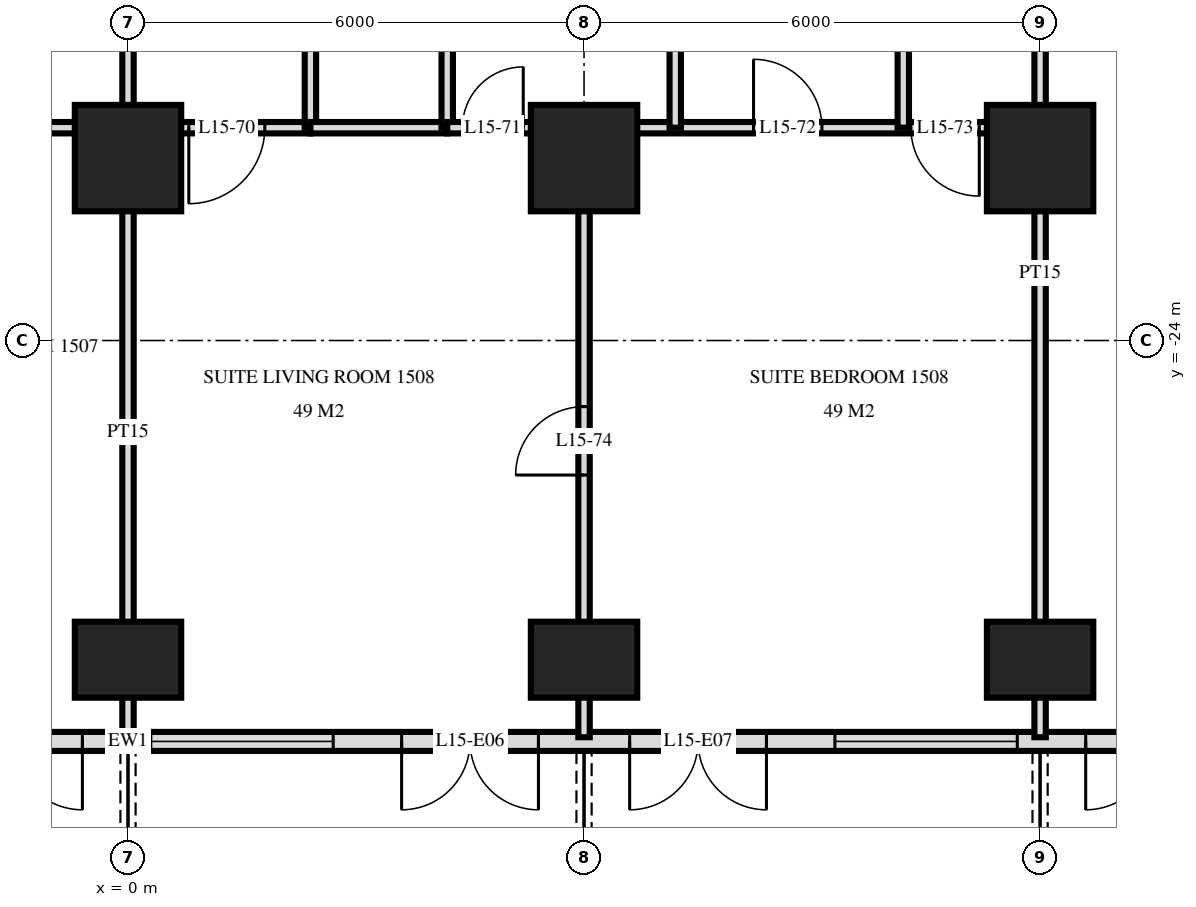
"""IFC4 building model, lengths in metres.
Left out: names, types, materials, properties, quantities, classifications, styles, units other than length and angle.
Written with IfcOpenShell. Run it as: python <this file> out.ifc"""

import sys

from ifc_helpers import new_model, si_unit, direction, frame, frame_2d, origin, origin_2d, place, context, subcontext, project, spatial, rectangle, extrude, element, fill, save


model = new_model("IFC4")
c1 = context("Model", 3, precision=1e-05, world=origin(), true_north=direction((0.0, 1.0)))
c2 = subcontext(c1, "Body", "Model", "MODEL_VIEW")
j1 = project(units=[si_unit("LENGTHUNIT", "METRE"), si_unit("PLANEANGLEUNIT", "RADIAN")], contexts=[c1])
p1 = place(None, origin())
s1 = spatial("IfcSite", under=j1, at=p1, CompositionType="ELEMENT")
p2 = place(p1, origin())
s2 = spatial("IfcBuilding", under=s1, at=p2, CompositionType="ELEMENT")
p3 = place(p2, frame((0.0, 0.0, 63.6)))
s3 = spatial("IfcBuildingStorey", under=s2, at=p3, CompositionType="ELEMENT", Elevation=63.6)
p4 = place(p3, frame((0.0, -28.2, 0.0), z_axis=(0.0, 0.0, 1.0), x_axis=(1.0, 0.0, 0.0)))
e1 = element("IfcColumn", 1, at=p4, inside=s3, PredefinedType="COLUMN", context=c2, shape_type="SweptSolid", body=[
    extrude(rectangle(XDim=1.4, YDim=1.0, at=origin_2d()), origin(), (0.0, 0.0, 1.0), 3.6),
])
p5 = place(p3, frame((0.0, -21.6, 0.0), z_axis=(0.0, 0.0, 1.0), x_axis=(1.0, 0.0, 0.0)))
e2 = element("IfcColumn", 2, at=p5, inside=s3, PredefinedType="COLUMN", context=c2, shape_type="SweptSolid", body=[
    extrude(rectangle(XDim=1.4, YDim=1.4, at=origin_2d()), origin(), (0.0, 0.0, 1.0), 3.6),
])
p6 = place(p3, frame((6.0, -28.2, 0.0), z_axis=(0.0, 0.0, 1.0), x_axis=(1.0, 0.0, 0.0)))
e3 = element("IfcColumn", 3, at=p6, inside=s3, PredefinedType="COLUMN", context=c2, shape_type="SweptSolid", body=[
    extrude(rectangle(XDim=1.4, YDim=1.0, at=origin_2d()), origin(), (0.0, 0.0, 1.0), 3.6),
])
p7 = place(p3, frame((6.0, -21.6, 0.0), z_axis=(0.0, 0.0, 1.0), x_axis=(1.0, 0.0, 0.0)))
e4 = element("IfcColumn", 4, at=p7, inside=s3, PredefinedType="COLUMN", context=c2, shape_type="SweptSolid", body=[
    extrude(rectangle(XDim=1.4, YDim=1.4, at=origin_2d()), origin(), (0.0, 0.0, 1.0), 3.6),
])
p8 = place(p3, frame((12.0, -28.2, 0.0), z_axis=(0.0, 0.0, 1.0), x_axis=(1.0, 0.0, 0.0)))
e5 = element("IfcColumn", 5, at=p8, inside=s3, PredefinedType="COLUMN", context=c2, shape_type="SweptSolid", body=[
    extrude(rectangle(XDim=1.4, YDim=1.0, at=origin_2d()), origin(), (0.0, 0.0, 1.0), 3.6),
])
p9 = place(p3, frame((12.0, -21.6, 0.0), z_axis=(0.0, 0.0, 1.0), x_axis=(1.0, 0.0, 0.0)))
e6 = element("IfcColumn", 6, at=p9, inside=s3, PredefinedType="COLUMN", context=c2, shape_type="SweptSolid", body=[
    extrude(rectangle(XDim=1.4, YDim=1.4, at=origin_2d()), origin(), (0.0, 0.0, 1.0), 3.6),
])
p10 = place(p3, frame((-28.775, -29.275, 0.0), z_axis=(0.0, 0.0, 1.0), x_axis=(1.0, 0.0, 0.0)))
e7 = element("IfcWall", 7, at=p10, inside=s3, PredefinedType="SOLIDWALL", context=c2, shape_type="SweptSolid", body=[
    extrude(rectangle(XDim=57.551, YDim=0.25, at=frame_2d((28.775, 0.0))), origin(), (0.0, 0.0, 1.0), 3.32),
])
p11 = place(p10, frame((0.575, 0.0, 0.0)))
e8 = element("IfcOpeningElement", 8, at=p11, cuts=e7, PredefinedType="OPENING", context=c2, shape_type="SweptSolid", body=[
    extrude(rectangle(XDim=1.8, YDim=2.4, at=frame_2d((0.9, 1.2))), frame((0.0, 0.135, 0.0), z_axis=(0.0, -1.0, 0.0), x_axis=(1.0, 0.0, 0.0)), (0.0, 0.0, 1.0), 0.27),
])
p12 = place(p10, frame((5.375, 0.0, 0.0)))
e9 = element("IfcOpeningElement", 9, at=p12, cuts=e7, PredefinedType="OPENING", context=c2, shape_type="SweptSolid", body=[
    extrude(rectangle(XDim=1.8, YDim=2.4, at=frame_2d((0.9, 1.2))), frame((0.0, 0.135, 0.0), z_axis=(0.0, -1.0, 0.0), x_axis=(1.0, 0.0, 0.0)), (0.0, 0.0, 1.0), 0.27),
])
p13 = place(p10, frame((8.075, 0.0, 0.3)))
e10 = element("IfcOpeningElement", 10, at=p13, cuts=e7, PredefinedType="OPENING", context=c2, shape_type="SweptSolid", body=[
    extrude(rectangle(XDim=2.4, YDim=2.1, at=frame_2d((1.2, 1.05))), frame((0.0, 0.135, 0.0), z_axis=(0.0, -1.0, 0.0), x_axis=(1.0, 0.0, 0.0)), (0.0, 0.0, 1.0), 0.27),
])
p14 = place(p10, frame((11.375, 0.0, 0.0)))
e11 = element("IfcOpeningElement", 11, at=p14, cuts=e7, PredefinedType="OPENING", context=c2, shape_type="SweptSolid", body=[
    extrude(rectangle(XDim=1.8, YDim=2.4, at=frame_2d((0.9, 1.2))), frame((0.0, 0.135, 0.0), z_axis=(0.0, -1.0, 0.0), x_axis=(1.0, 0.0, 0.0)), (0.0, 0.0, 1.0), 0.27),
])
p15 = place(p10, frame((14.075, 0.0, 0.3)))
e12 = element("IfcOpeningElement", 12, at=p15, cuts=e7, PredefinedType="OPENING", context=c2, shape_type="SweptSolid", body=[
    extrude(rectangle(XDim=2.4, YDim=2.1, at=frame_2d((1.2, 1.05))), frame((0.0, 0.135, 0.0), z_axis=(0.0, -1.0, 0.0), x_axis=(1.0, 0.0, 0.0)), (0.0, 0.0, 1.0), 0.27),
])
p16 = place(p10, frame((17.375, 0.0, 0.0)))
e13 = element("IfcOpeningElement", 13, at=p16, cuts=e7, PredefinedType="OPENING", context=c2, shape_type="SweptSolid", body=[
    extrude(rectangle(XDim=1.8, YDim=2.4, at=frame_2d((0.9, 1.2))), frame((0.0, 0.135, 0.0), z_axis=(0.0, -1.0, 0.0), x_axis=(1.0, 0.0, 0.0)), (0.0, 0.0, 1.0), 0.27),
])
p17 = place(p10, frame((20.075, 0.0, 0.3)))
e14 = element("IfcOpeningElement", 14, at=p17, cuts=e7, PredefinedType="OPENING", context=c2, shape_type="SweptSolid", body=[
    extrude(rectangle(XDim=2.4, YDim=2.1, at=frame_2d((1.2, 1.05))), frame((0.0, 0.135, 0.0), z_axis=(0.0, -1.0, 0.0), x_axis=(1.0, 0.0, 0.0)), (0.0, 0.0, 1.0), 0.27),
])
p18 = place(p10, frame((23.075, 0.0, 0.3)))
e15 = element("IfcOpeningElement", 15, at=p18, cuts=e7, PredefinedType="OPENING", context=c2, shape_type="SweptSolid", body=[
    extrude(rectangle(XDim=2.4, YDim=2.1, at=frame_2d((1.2, 1.05))), frame((0.0, 0.135, 0.0), z_axis=(0.0, -1.0, 0.0), x_axis=(1.0, 0.0, 0.0)), (0.0, 0.0, 1.0), 0.27),
])
p19 = place(p10, frame((26.375, 0.0, 0.0)))
e16 = element("IfcOpeningElement", 16, at=p19, cuts=e7, PredefinedType="OPENING", context=c2, shape_type="SweptSolid", body=[
    extrude(rectangle(XDim=1.8, YDim=2.4, at=frame_2d((0.9, 1.2))), frame((0.0, 0.135, 0.0), z_axis=(0.0, -1.0, 0.0), x_axis=(1.0, 0.0, 0.0)), (0.0, 0.0, 1.0), 0.27),
])
p20 = place(p10, frame((29.075, 0.0, 0.3)))
e17 = element("IfcOpeningElement", 17, at=p20, cuts=e7, PredefinedType="OPENING", context=c2, shape_type="SweptSolid", body=[
    extrude(rectangle(XDim=2.4, YDim=2.1, at=frame_2d((1.2, 1.05))), frame((0.0, 0.135, 0.0), z_axis=(0.0, -1.0, 0.0), x_axis=(1.0, 0.0, 0.0)), (0.0, 0.0, 1.0), 0.27),
])
p21 = place(p10, frame((32.375, 0.0, 0.0)))
e18 = element("IfcOpeningElement", 18, at=p21, cuts=e7, PredefinedType="OPENING", context=c2, shape_type="SweptSolid", body=[
    extrude(rectangle(XDim=1.8, YDim=2.4, at=frame_2d((0.9, 1.2))), frame((0.0, 0.135, 0.0), z_axis=(0.0, -1.0, 0.0), x_axis=(1.0, 0.0, 0.0)), (0.0, 0.0, 1.0), 0.27),
])
p22 = place(p10, frame((35.375, 0.0, 0.0)))
e19 = element("IfcOpeningElement", 19, at=p22, cuts=e7, PredefinedType="OPENING", context=c2, shape_type="SweptSolid", body=[
    extrude(rectangle(XDim=1.8, YDim=2.4, at=frame_2d((0.9, 1.2))), frame((0.0, 0.135, 0.0), z_axis=(0.0, -1.0, 0.0), x_axis=(1.0, 0.0, 0.0)), (0.0, 0.0, 1.0), 0.27),
])
p23 = place(p10, frame((38.075, 0.0, 0.3)))
e20 = element("IfcOpeningElement", 20, at=p23, cuts=e7, PredefinedType="OPENING", context=c2, shape_type="SweptSolid", body=[
    extrude(rectangle(XDim=2.4, YDim=2.1, at=frame_2d((1.2, 1.05))), frame((0.0, 0.135, 0.0), z_axis=(0.0, -1.0, 0.0), x_axis=(1.0, 0.0, 0.0)), (0.0, 0.0, 1.0), 0.27),
])
p24 = place(p10, frame((41.375, 0.0, 0.0)))
e21 = element("IfcOpeningElement", 21, at=p24, cuts=e7, PredefinedType="OPENING", context=c2, shape_type="SweptSolid", body=[
    extrude(rectangle(XDim=1.8, YDim=2.4, at=frame_2d((0.9, 1.2))), frame((0.0, 0.135, 0.0), z_axis=(0.0, -1.0, 0.0), x_axis=(1.0, 0.0, 0.0)), (0.0, 0.0, 1.0), 0.27),
])
p25 = place(p10, frame((44.075, 0.0, 0.3)))
e22 = element("IfcOpeningElement", 22, at=p25, cuts=e7, PredefinedType="OPENING", context=c2, shape_type="SweptSolid", body=[
    extrude(rectangle(XDim=2.4, YDim=2.1, at=frame_2d((1.2, 1.05))), frame((0.0, 0.135, 0.0), z_axis=(0.0, -1.0, 0.0), x_axis=(1.0, 0.0, 0.0)), (0.0, 0.0, 1.0), 0.27),
])
p26 = place(p10, frame((47.075, 0.0, 0.3)))
e23 = element("IfcOpeningElement", 23, at=p26, cuts=e7, PredefinedType="OPENING", context=c2, shape_type="SweptSolid", body=[
    extrude(rectangle(XDim=2.4, YDim=2.1, at=frame_2d((1.2, 1.05))), frame((0.0, 0.135, 0.0), z_axis=(0.0, -1.0, 0.0), x_axis=(1.0, 0.0, 0.0)), (0.0, 0.0, 1.0), 0.27),
])
p27 = place(p10, frame((50.375, 0.0, 0.0)))
e24 = element("IfcOpeningElement", 24, at=p27, cuts=e7, PredefinedType="OPENING", context=c2, shape_type="SweptSolid", body=[
    extrude(rectangle(XDim=1.8, YDim=2.4, at=frame_2d((0.9, 1.2))), frame((0.0, 0.135, 0.0), z_axis=(0.0, -1.0, 0.0), x_axis=(1.0, 0.0, 0.0)), (0.0, 0.0, 1.0), 0.27),
])
p28 = place(p10, frame((53.375, 0.0, 0.0)))
e25 = element("IfcOpeningElement", 25, at=p28, cuts=e7, PredefinedType="OPENING", context=c2, shape_type="SweptSolid", body=[
    extrude(rectangle(XDim=1.8, YDim=2.4, at=frame_2d((0.9, 1.2))), frame((0.0, 0.135, 0.0), z_axis=(0.0, -1.0, 0.0), x_axis=(1.0, 0.0, 0.0)), (0.0, 0.0, 1.0), 0.27),
])
p29 = place(p3, frame((12.0, -29.22, 0.0), z_axis=(0.0, 0.0, 1.0), x_axis=(0.0, 1.0, 0.0)))
e26 = element("IfcWall", 26, at=p29, inside=s3, PredefinedType="PARTITIONING", context=c2, shape_type="SweptSolid", body=[
    extrude(rectangle(XDim=12.22, YDim=0.15, at=frame_2d((6.11, 0.0))), origin(), (0.0, 0.0, 1.0), 3.32),
])
for number, where, z_axis, x_axis in (
    (27, (10.2, -21.2, 0.0), (0.0, 0.0, 1.0), (0.0, 1.0, 0.0)),
    (28, (7.2, -21.2, 0.0), (0.0, 0.0, 1.0), (0.0, 1.0, 0.0)),
):
    element("IfcWall", number, at=place(p3, frame(where, z_axis=z_axis, x_axis=x_axis)), inside=s3, PredefinedType="PARTITIONING", context=c2, shape_type="SweptSolid", body=[
        extrude(rectangle(XDim=4.2, YDim=0.15, at=frame_2d((2.1, 0.0))), origin(), (0.0, 0.0, 1.0), 3.32),
    ])
p30 = place(p3, frame((6.0, -29.22, 0.0), z_axis=(0.0, 0.0, 1.0), x_axis=(0.0, 1.0, 0.0)))
e29 = element("IfcWall", 29, at=p30, inside=s3, PredefinedType="PARTITIONING", context=c2, shape_type="SweptSolid", body=[
    extrude(rectangle(XDim=8.02, YDim=0.15, at=frame_2d((4.01, 0.0))), origin(), (0.0, 0.0, 1.0), 3.32),
])
p31 = place(p30, frame((3.45, 0.0, 0.0)))
e30 = element("IfcOpeningElement", 30, at=p31, cuts=e29, PredefinedType="OPENING", context=c2, shape_type="SweptSolid", body=[
    extrude(rectangle(XDim=0.9, YDim=2.1, at=frame_2d((0.45, 1.05))), frame((0.0, 0.085, 0.0), z_axis=(0.0, -1.0, 0.0), x_axis=(1.0, 0.0, 0.0)), (0.0, 0.0, 1.0), 0.17),
])
p32 = place(p3, frame((4.2, -21.2, 0.0), z_axis=(0.0, 0.0, 1.0), x_axis=(0.0, 1.0, 0.0)))
e31 = element("IfcWall", 31, at=p32, inside=s3, PredefinedType="PLUMBINGWALL", context=c2, shape_type="SweptSolid", body=[
    extrude(rectangle(XDim=4.2, YDim=0.15, at=frame_2d((2.1, 0.0))), origin(), (0.0, 0.0, 1.0), 3.32),
])
p33 = place(p3, frame((2.4, -21.2, 0.0), z_axis=(0.0, 0.0, 1.0), x_axis=(0.0, 1.0, 0.0)))
e32 = element("IfcWall", 32, at=p33, inside=s3, PredefinedType="PARTITIONING", context=c2, shape_type="SweptSolid", body=[
    extrude(rectangle(XDim=4.2, YDim=0.15, at=frame_2d((2.1, 0.0))), origin(), (0.0, 0.0, 1.0), 3.32),
])
p34 = place(p33, frame((1.6, 0.0, 0.0)))
e33 = element("IfcOpeningElement", 33, at=p34, cuts=e32, PredefinedType="OPENING", context=c2, shape_type="SweptSolid", body=[
    extrude(rectangle(XDim=1.0, YDim=2.1, at=frame_2d((0.5, 1.05))), frame((0.0, 0.085, 0.0), z_axis=(0.0, -1.0, 0.0), x_axis=(1.0, 0.0, 0.0)), (0.0, 0.0, 1.0), 0.17),
])
p35 = place(p3, frame((0.0, -21.2, 0.0), z_axis=(0.0, 0.0, 1.0), x_axis=(0.0, 1.0, 0.0)))
e34 = element("IfcWall", 34, at=p35, inside=s3, PredefinedType="PARTITIONING", context=c2, shape_type="SweptSolid", body=[
    extrude(rectangle(XDim=4.2, YDim=0.15, at=frame_2d((2.1, 0.0))), origin(), (0.0, 0.0, 1.0), 3.32),
])
p36 = place(p3, frame((0.0, -29.22, 0.0), z_axis=(0.0, 0.0, 1.0), x_axis=(0.0, 1.0, 0.0)))
e35 = element("IfcWall", 35, at=p36, inside=s3, PredefinedType="PARTITIONING", context=c2, shape_type="SweptSolid", body=[
    extrude(rectangle(XDim=8.02, YDim=0.15, at=frame_2d((4.01, 0.0))), origin(), (0.0, 0.0, 1.0), 3.32),
])
p37 = place(p3, frame((0.0, -21.2, 0.0), z_axis=(0.0, 0.0, 1.0), x_axis=(1.0, 0.0, 0.0)))
e36 = element("IfcWall", 36, at=p37, inside=s3, PredefinedType="PARTITIONING", context=c2, shape_type="SweptSolid", body=[
    extrude(rectangle(XDim=2.4, YDim=0.15, at=frame_2d((1.2, 0.0))), origin(), (0.0, 0.0, 1.0), 3.32),
])
p38 = place(p37, frame((0.8, 0.0, 0.0)))
e37 = element("IfcOpeningElement", 37, at=p38, cuts=e36, PredefinedType="OPENING", context=c2, shape_type="SweptSolid", body=[
    extrude(rectangle(XDim=1.0, YDim=2.1, at=frame_2d((0.5, 1.05))), frame((0.0, 0.085, 0.0), z_axis=(0.0, -1.0, 0.0), x_axis=(1.0, 0.0, 0.0)), (0.0, 0.0, 1.0), 0.17),
])
p39 = place(p3, frame((-1.7, -21.2, 0.0), z_axis=(0.0, 0.0, 1.0), x_axis=(1.0, 0.0, 0.0)))
e38 = element("IfcWall", 38, at=p39, inside=s3, PredefinedType="PARTITIONING", context=c2, shape_type="SweptSolid", body=[
    extrude(rectangle(XDim=1.7, YDim=0.15, at=frame_2d((0.85, 0.0))), origin(), (0.0, 0.0, 1.0), 3.32),
])
p40 = place(p3, frame((4.2, -21.2, 0.0), z_axis=(0.0, 0.0, 1.0), x_axis=(1.0, 0.0, 0.0)))
e39 = element("IfcWall", 39, at=p40, inside=s3, PredefinedType="PARTITIONING", context=c2, shape_type="SweptSolid", body=[
    extrude(rectangle(XDim=7.8, YDim=0.15, at=frame_2d((3.9, 0.0))), origin(), (0.0, 0.0, 1.0), 3.32),
])
p41 = place(p40, frame((0.2, 0.0, 0.0)))
e40 = element("IfcOpeningElement", 40, at=p41, cuts=e39, PredefinedType="OPENING", context=c2, shape_type="SweptSolid", body=[
    extrude(rectangle(XDim=0.8, YDim=2.1, at=frame_2d((0.4, 1.05))), frame((0.0, 0.085, 0.0), z_axis=(0.0, -1.0, 0.0), x_axis=(1.0, 0.0, 0.0)), (0.0, 0.0, 1.0), 0.17),
])
p42 = place(p40, frame((4.03, 0.0, 0.0)))
e41 = element("IfcOpeningElement", 41, at=p42, cuts=e39, PredefinedType="OPENING", context=c2, shape_type="SweptSolid", body=[
    extrude(rectangle(XDim=0.9, YDim=2.1, at=frame_2d((0.45, 1.05))), frame((0.0, 0.085, 0.0), z_axis=(0.0, -1.0, 0.0), x_axis=(1.0, 0.0, 0.0)), (0.0, 0.0, 1.0), 0.17),
])
p43 = place(p40, frame((6.1, 0.0, 0.0)))
e42 = element("IfcOpeningElement", 42, at=p43, cuts=e39, PredefinedType="OPENING", context=c2, shape_type="SweptSolid", body=[
    extrude(rectangle(XDim=0.9, YDim=2.1, at=frame_2d((0.45, 1.05))), frame((0.0, 0.085, 0.0), z_axis=(0.0, -1.0, 0.0), x_axis=(1.0, 0.0, 0.0)), (0.0, 0.0, 1.0), 0.17),
])
p44 = place(p3, frame((2.4, -21.2, 0.0), z_axis=(0.0, 0.0, 1.0), x_axis=(1.0, 0.0, 0.0)))
e43 = element("IfcWall", 43, at=p44, inside=s3, PredefinedType="PLUMBINGWALL", context=c2, shape_type="SweptSolid", body=[
    extrude(rectangle(XDim=1.8, YDim=0.15, at=frame_2d((0.9, 0.0))), origin(), (0.0, 0.0, 1.0), 3.32),
])
p45 = place(p19, frame((0.9, 0.0, 0.0), z_axis=(0.0, 0.0, 1.0), x_axis=(-1.0, 0.0, 0.0)))
e44 = element("IfcDoor", 44, at=p45, inside=s3, OperationType="DOUBLE_DOOR_SINGLE_SWING", PredefinedType="DOOR", context=c2, shape_type="SweptSolid", body=[
    extrude(rectangle(XDim=1.8, YDim=2.4, at=frame_2d((0.0, 1.2))), frame((0.0, -0.025, 0.0), z_axis=(0.0, 1.0, 0.0), x_axis=(-1.0, 0.0, 0.0)), (0.0, 0.0, 1.0), 0.05),
])
fill(e16, e44)
p46 = place(p20, origin())
e45 = element("IfcWindow", 45, at=p46, inside=s3, PartitioningType="SINGLE_PANEL", PredefinedType="WINDOW", context=c2, shape_type="SweptSolid", body=[
    extrude(rectangle(XDim=2.4, YDim=2.1, at=frame_2d((1.2, 1.05))), frame((0.0, 0.03, 0.0), z_axis=(0.0, -1.0, 0.0), x_axis=(1.0, 0.0, 0.0)), (0.0, 0.0, 1.0), 0.06),
])
fill(e17, e45)
p47 = place(p21, frame((0.9, 0.0, 0.0), z_axis=(0.0, 0.0, 1.0), x_axis=(-1.0, 0.0, 0.0)))
e46 = element("IfcDoor", 46, at=p47, inside=s3, OperationType="DOUBLE_DOOR_SINGLE_SWING", PredefinedType="DOOR", context=c2, shape_type="SweptSolid", body=[
    extrude(rectangle(XDim=1.8, YDim=2.4, at=frame_2d((0.0, 1.2))), frame((0.0, -0.025, 0.0), z_axis=(0.0, 1.0, 0.0), x_axis=(-1.0, 0.0, 0.0)), (0.0, 0.0, 1.0), 0.05),
])
fill(e18, e46)
p48 = place(p22, frame((0.9, 0.0, 0.0), z_axis=(0.0, 0.0, 1.0), x_axis=(-1.0, 0.0, 0.0)))
e47 = element("IfcDoor", 47, at=p48, inside=s3, OperationType="DOUBLE_DOOR_SINGLE_SWING", PredefinedType="DOOR", context=c2, shape_type="SweptSolid", body=[
    extrude(rectangle(XDim=1.8, YDim=2.4, at=frame_2d((0.0, 1.2))), frame((0.0, -0.025, 0.0), z_axis=(0.0, 1.0, 0.0), x_axis=(-1.0, 0.0, 0.0)), (0.0, 0.0, 1.0), 0.05),
])
fill(e19, e47)
p49 = place(p23, origin())
e48 = element("IfcWindow", 48, at=p49, inside=s3, PartitioningType="SINGLE_PANEL", PredefinedType="WINDOW", context=c2, shape_type="SweptSolid", body=[
    extrude(rectangle(XDim=2.4, YDim=2.1, at=frame_2d((1.2, 1.05))), frame((0.0, 0.03, 0.0), z_axis=(0.0, -1.0, 0.0), x_axis=(1.0, 0.0, 0.0)), (0.0, 0.0, 1.0), 0.06),
])
fill(e20, e48)
p50 = place(p24, frame((0.9, 0.0, 0.0), z_axis=(0.0, 0.0, 1.0), x_axis=(-1.0, 0.0, 0.0)))
e49 = element("IfcDoor", 49, at=p50, inside=s3, OperationType="DOUBLE_DOOR_SINGLE_SWING", PredefinedType="DOOR", context=c2, shape_type="SweptSolid", body=[
    extrude(rectangle(XDim=1.8, YDim=2.4, at=frame_2d((0.0, 1.2))), frame((0.0, -0.025, 0.0), z_axis=(0.0, 1.0, 0.0), x_axis=(-1.0, 0.0, 0.0)), (0.0, 0.0, 1.0), 0.05),
])
fill(e21, e49)
p51 = place(p38, frame((0.5, 0.0, 0.0), z_axis=(0.0, 0.0, 1.0), x_axis=(-1.0, 0.0, 0.0)))
e50 = element("IfcDoor", 50, at=p51, inside=s3, OperationType="SINGLE_SWING_LEFT", PredefinedType="DOOR", context=c2, shape_type="SweptSolid", body=[
    extrude(rectangle(XDim=1.0, YDim=2.1, at=frame_2d((0.0, 1.05))), frame((0.0, -0.025, 0.0), z_axis=(0.0, 1.0, 0.0), x_axis=(-1.0, 0.0, 0.0)), (0.0, 0.0, 1.0), 0.05),
])
fill(e37, e50)
p52 = place(p41, origin())
e51 = element("IfcDoor", 51, at=p52, inside=s3, OperationType="SINGLE_SWING_LEFT", PredefinedType="DOOR", context=c2, shape_type="SweptSolid", body=[
    extrude(rectangle(XDim=0.8, YDim=2.1, at=frame_2d((0.4, 1.05))), frame((0.0, 0.025, 0.0), z_axis=(0.0, -1.0, 0.0), x_axis=(1.0, 0.0, 0.0)), (0.0, 0.0, 1.0), 0.05),
])
fill(e40, e51)
p53 = place(p42, origin())
e52 = element("IfcDoor", 52, at=p53, inside=s3, OperationType="SINGLE_SWING_RIGHT", PredefinedType="DOOR", context=c2, shape_type="SweptSolid", body=[
    extrude(rectangle(XDim=0.9, YDim=2.1, at=frame_2d((0.45, 1.05))), frame((0.0, 0.025, 0.0), z_axis=(0.0, -1.0, 0.0), x_axis=(1.0, 0.0, 0.0)), (0.0, 0.0, 1.0), 0.05),
])
fill(e41, e52)
p54 = place(p43, frame((0.45, 0.0, 0.0), z_axis=(0.0, 0.0, 1.0), x_axis=(-1.0, 0.0, 0.0)))
e53 = element("IfcDoor", 53, at=p54, inside=s3, OperationType="SINGLE_SWING_RIGHT", PredefinedType="DOOR", context=c2, shape_type="SweptSolid", body=[
    extrude(rectangle(XDim=0.9, YDim=2.1, at=frame_2d((0.0, 1.05))), frame((0.0, -0.025, 0.0), z_axis=(0.0, 1.0, 0.0), x_axis=(-1.0, 0.0, 0.0)), (0.0, 0.0, 1.0), 0.05),
])
fill(e42, e53)
p55 = place(p31, origin())
e54 = element("IfcDoor", 54, at=p55, inside=s3, OperationType="SINGLE_SWING_RIGHT", PredefinedType="DOOR", context=c2, shape_type="SweptSolid", body=[
    extrude(rectangle(XDim=0.9, YDim=2.1, at=frame_2d((0.45, 1.05))), frame((0.0, 0.025, 0.0), z_axis=(0.0, -1.0, 0.0), x_axis=(1.0, 0.0, 0.0)), (0.0, 0.0, 1.0), 0.05),
])
fill(e30, e54)
save(model, sys.argv[1])
